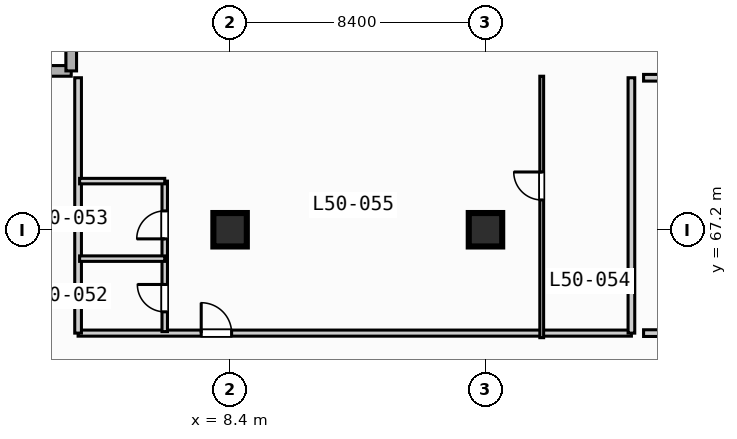
"""IFC4 building model, lengths in metres.
Left out: names, types, materials, properties, quantities, classifications, styles, units other than length and angle.
Written with IfcOpenShell. Run it as: python <this file> out.ifc"""

import sys

from ifc_helpers import new_model, si_unit, direction, frame, frame_2d, origin, origin_2d, place, context, subcontext, project, spatial, rectangle, extrude, element, fill, save


model = new_model("IFC4")
c1 = context("Model", 3, precision=1e-05, world=origin(), true_north=direction((0.0, 1.0)))
c2 = subcontext(c1, "Body", "Model", "MODEL_VIEW")
j1 = project(units=[si_unit("LENGTHUNIT", "METRE"), si_unit("PLANEANGLEUNIT", "RADIAN")], contexts=[c1])
p1 = place(None, origin())
s1 = spatial("IfcSite", under=j1, at=p1, CompositionType="ELEMENT")
p2 = place(p1, origin())
s2 = spatial("IfcBuilding", under=s1, at=p2, CompositionType="ELEMENT")
p3 = place(p2, frame((0.0, 0.0, 205.0)))
s3 = spatial("IfcBuildingStorey", under=s2, at=p3, CompositionType="ELEMENT", Elevation=205.0)
for number, where, z_axis, x_axis in (
    (1, (8.4, 67.2, 0.0), (0.0, 0.0, 1.0), (1.0, 0.0, 0.0)),
    (2, (16.8, 67.2, 0.0), (0.0, 0.0, 1.0), (1.0, 0.0, 0.0)),
):
    element("IfcColumn", number, at=place(p3, frame(where, z_axis=z_axis, x_axis=x_axis)), inside=s3, PredefinedType="COLUMN", context=c2, shape_type="SweptSolid", body=[
        extrude(rectangle(XDim=1.1, YDim=1.1, at=origin_2d()), origin(), (0.0, 0.0, 1.0), 3.7),
    ])
for number, where, z_axis, x_axis in (
    (3, (0.175, 72.425, 0.0), (0.0, 0.0, 1.0), (1.0, 0.0, 0.0)),
    (4, (3.175, 72.425, 0.0), (0.0, 0.0, 1.0), (0.0, 1.0, 0.0)),
):
    element("IfcWall", number, at=place(p3, frame(where, z_axis=z_axis, x_axis=x_axis)), inside=s3, PredefinedType="STANDARD", context=c2, shape_type="SweptSolid", body=[
        extrude(rectangle(XDim=3.0, YDim=0.35, at=frame_2d((1.5, 0.0))), origin(), (0.0, 0.0, 1.0), 3.47),
    ])
p4 = place(p3, frame((3.4, 63.8, 0.0), z_axis=(0.0, 0.0, 1.0), x_axis=(1.0, 0.0, 0.0)))
e5 = element("IfcWall", 5, at=p4, inside=s3, PredefinedType="PARTITIONING", context=c2, shape_type="SweptSolid", body=[
    extrude(rectangle(XDim=18.2, YDim=0.2, at=frame_2d((9.1, 0.0))), origin(), (0.0, 0.0, 1.0), 3.47),
])
p5 = place(p4, frame((4.05, 0.0, 0.0)))
e6 = element("IfcOpeningElement", 6, at=p5, cuts=e5, PredefinedType="OPENING", context=c2, shape_type="SweptSolid", body=[
    extrude(rectangle(XDim=1.0, YDim=2.15, at=frame_2d((0.5, 1.075))), frame((0.0, 0.11, 0.0), z_axis=(0.0, -1.0, 0.0), x_axis=(1.0, 0.0, 0.0)), (0.0, 0.0, 1.0), 0.22),
])
for number, where, z_axis, x_axis in (
    (7, (21.6, 63.8, 0.0), (0.0, 0.0, 1.0), (0.0, 1.0, 0.0)),
    (8, (3.4, 63.8, 0.0), (0.0, 0.0, 1.0), (0.0, 1.0, 0.0)),
):
    element("IfcWall", number, at=place(p3, frame(where, z_axis=z_axis, x_axis=x_axis)), inside=s3, PredefinedType="PARTITIONING", context=c2, shape_type="SweptSolid", body=[
        extrude(rectangle(XDim=8.4, YDim=0.22, at=frame_2d((4.2, 0.0))), origin(), (0.0, 0.0, 1.0), 3.47),
    ])
p6 = place(p3, frame((6.25, 63.85, 0.0), z_axis=(0.0, 0.0, 1.0), x_axis=(0.0, 1.0, 0.0)))
e9 = element("IfcWall", 9, at=p6, inside=s3, PredefinedType="PLUMBINGWALL", context=c2, shape_type="SweptSolid", body=[
    extrude(rectangle(XDim=4.95, YDim=0.18, at=frame_2d((2.475, 0.0))), origin(), (0.0, 0.0, 1.0), 3.47),
])
p7 = place(p6, frame((0.65, 0.0, 0.0)))
e10 = element("IfcOpeningElement", 10, at=p7, cuts=e9, PredefinedType="OPENING", context=c2, shape_type="SweptSolid", body=[
    extrude(rectangle(XDim=0.9, YDim=2.1, at=frame_2d((0.45, 1.05))), frame((0.0, 0.1, 0.0), z_axis=(0.0, -1.0, 0.0), x_axis=(1.0, 0.0, 0.0)), (0.0, 0.0, 1.0), 0.2),
])
p8 = place(p6, frame((3.05, 0.0, 0.0)))
e11 = element("IfcOpeningElement", 11, at=p8, cuts=e9, PredefinedType="OPENING", context=c2, shape_type="SweptSolid", body=[
    extrude(rectangle(XDim=0.92, YDim=2.1, at=frame_2d((0.46, 1.05))), frame((0.0, 0.1, 0.0), z_axis=(0.0, -1.0, 0.0), x_axis=(1.0, 0.0, 0.0)), (0.0, 0.0, 1.0), 0.2),
])
for number, where, z_axis, x_axis in (
    (12, (3.45, 66.25, 0.0), (0.0, 0.0, 1.0), (1.0, 0.0, 0.0)),
    (13, (3.45, 68.8, 0.0), (0.0, 0.0, 1.0), (1.0, 0.0, 0.0)),
):
    element("IfcWall", number, at=place(p3, frame(where, z_axis=z_axis, x_axis=x_axis)), inside=s3, PredefinedType="PLUMBINGWALL", context=c2, shape_type="SweptSolid", body=[
        extrude(rectangle(XDim=2.8, YDim=0.18, at=frame_2d((1.4, 0.0))), origin(), (0.0, 0.0, 1.0), 3.47),
    ])
p9 = place(p3, frame((18.65, 63.65, 0.0), z_axis=(0.0, 0.0, 1.0), x_axis=(0.0, 1.0, 0.0)))
e14 = element("IfcWall", 14, at=p9, inside=s3, PredefinedType="PARTITIONING", context=c2, shape_type="SweptSolid", body=[
    extrude(rectangle(XDim=8.6, YDim=0.125, at=frame_2d((4.3, 0.0))), origin(), (0.0, 0.0, 1.0), 3.47),
])
p10 = place(p9, frame((4.53, 0.0, 0.0)))
e15 = element("IfcOpeningElement", 15, at=p10, cuts=e14, PredefinedType="OPENING", context=c2, shape_type="SweptSolid", body=[
    extrude(rectangle(XDim=0.92, YDim=2.1, at=frame_2d((0.46, 1.05))), frame((0.0, 0.073, 0.0), z_axis=(0.0, -1.0, 0.0), x_axis=(1.0, 0.0, 0.0)), (0.0, 0.0, 1.0), 0.145),
])
p11 = place(p3, frame((22.0, 72.2, 0.0), z_axis=(0.0, 0.0, 1.0), x_axis=(1.0, 0.0, 0.0)))
e16 = element("IfcWall", 16, at=p11, inside=s3, PredefinedType="PARTITIONING", context=c2, shape_type="SweptSolid", body=[
    extrude(rectangle(XDim=11.3, YDim=0.22, at=frame_2d((5.65, 0.0))), origin(), (0.0, 0.0, 1.0), 3.47),
])
p12 = place(p3, frame((22.0, 63.8, 0.0), z_axis=(0.0, 0.0, 1.0), x_axis=(1.0, 0.0, 0.0)))
e17 = element("IfcWall", 17, at=p12, inside=s3, PredefinedType="PARTITIONING", context=c2, shape_type="SweptSolid", body=[
    extrude(rectangle(XDim=6.0, YDim=0.22, at=frame_2d((3.0, 0.0))), origin(), (0.0, 0.0, 1.0), 3.47),
])
p13 = place(p5, origin())
e18 = element("IfcDoor", 18, at=p13, inside=s3, OperationType="SINGLE_SWING_LEFT", PredefinedType="DOOR", context=c2, shape_type="SweptSolid", body=[
    extrude(rectangle(XDim=1.0, YDim=2.15, at=frame_2d((0.5, 1.075))), frame((0.0, 0.025, 0.0), z_axis=(0.0, -1.0, 0.0), x_axis=(1.0, 0.0, 0.0)), (0.0, 0.0, 1.0), 0.05),
])
fill(e6, e18)
p14 = place(p7, origin())
e19 = element("IfcDoor", 19, at=p14, inside=s3, OperationType="SINGLE_SWING_RIGHT", PredefinedType="DOOR", context=c2, shape_type="SweptSolid", body=[
    extrude(rectangle(XDim=0.9, YDim=2.1, at=frame_2d((0.45, 1.05))), frame((0.0, 0.025, 0.0), z_axis=(0.0, -1.0, 0.0), x_axis=(1.0, 0.0, 0.0)), (0.0, 0.0, 1.0), 0.05),
])
fill(e10, e19)
p15 = place(p8, origin())
e20 = element("IfcDoor", 20, at=p15, inside=s3, OperationType="SINGLE_SWING_LEFT", PredefinedType="DOOR", context=c2, shape_type="SweptSolid", body=[
    extrude(rectangle(XDim=0.92, YDim=2.1, at=frame_2d((0.46, 1.05))), frame((0.0, 0.025, 0.0), z_axis=(0.0, -1.0, 0.0), x_axis=(1.0, 0.0, 0.0)), (0.0, 0.0, 1.0), 0.05),
])
fill(e11, e20)
p16 = place(p10, origin())
e21 = element("IfcDoor", 21, at=p16, inside=s3, OperationType="SINGLE_SWING_RIGHT", PredefinedType="DOOR", context=c2, shape_type="SweptSolid", body=[
    extrude(rectangle(XDim=0.92, YDim=2.1, at=frame_2d((0.46, 1.05))), frame((0.0, 0.025, 0.0), z_axis=(0.0, -1.0, 0.0), x_axis=(1.0, 0.0, 0.0)), (0.0, 0.0, 1.0), 0.05),
])
fill(e15, e21)
save(model, sys.argv[1])
